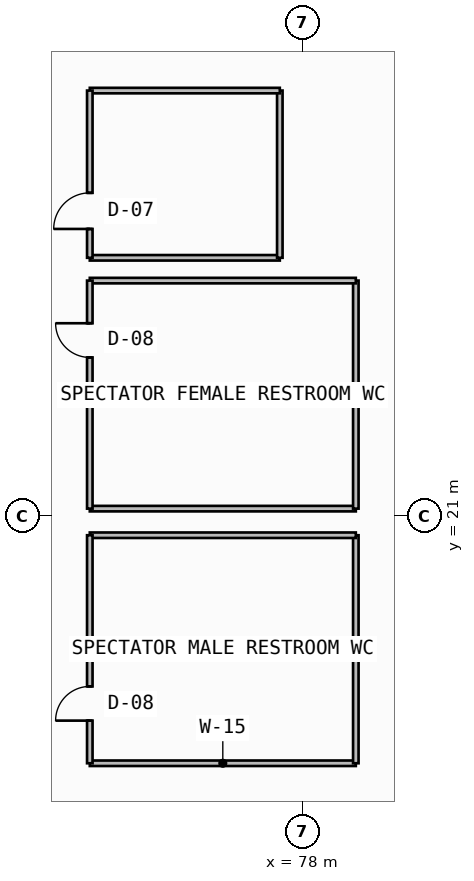
"""IFC4 building model, lengths in metres.
Left out: names, types, materials, properties, quantities, classifications, styles, units other than length and angle.
Written with IfcOpenShell. Run it as: python <this file> out.ifc"""

import sys

from ifc_helpers import new_model, si_unit, direction, frame, frame_2d, origin, place, context, subcontext, project, spatial, rectangle, extrude, element, fill, save


model = new_model("IFC4")
c1 = context("Model", 3, precision=1e-05, world=origin(), true_north=direction((0.0, 1.0)))
c2 = subcontext(c1, "Body", "Model", "MODEL_VIEW")
j1 = project(units=[si_unit("LENGTHUNIT", "METRE"), si_unit("PLANEANGLEUNIT", "RADIAN")], contexts=[c1])
p1 = place(None, origin())
s1 = spatial("IfcSite", under=j1, at=p1, CompositionType="ELEMENT")
p2 = place(p1, origin())
s2 = spatial("IfcBuilding", under=s1, at=p2, CompositionType="ELEMENT")
p3 = place(p2, frame((0.0, 0.0, 13.2)))
s3 = spatial("IfcBuildingStorey", under=s2, at=p3, CompositionType="ELEMENT", Elevation=13.2)
p4 = place(p3, frame((72.4, 14.5, 0.0), z_axis=(0.0, 0.0, 1.0), x_axis=(1.0, 0.0, 0.0)))
e1 = element("IfcWall", 1, at=p4, inside=s3, PredefinedType="PARTITIONING", context=c2, shape_type="SweptSolid", body=[
    extrude(rectangle(XDim=7.0, YDim=0.145, at=frame_2d((3.5, 0.0))), origin(), (0.0, 0.0, 1.0), 3.365),
])
p5 = place(p3, frame((79.4, 14.5, 0.0), z_axis=(0.0, 0.0, 1.0), x_axis=(0.0, 1.0, 0.0)))
e2 = element("IfcWall", 2, at=p5, inside=s3, PredefinedType="PARTITIONING", context=c2, shape_type="SweptSolid", body=[
    extrude(rectangle(XDim=6.0, YDim=0.145, at=frame_2d((3.0, 0.0))), origin(), (0.0, 0.0, 1.0), 3.165),
])
p6 = place(p3, frame((79.4, 20.5, 0.0), z_axis=(0.0, 0.0, 1.0), x_axis=(-1.0, 0.0, 0.0)))
e3 = element("IfcWall", 3, at=p6, inside=s3, PredefinedType="PARTITIONING", context=c2, shape_type="SweptSolid", body=[
    extrude(rectangle(XDim=7.0, YDim=0.145, at=frame_2d((3.5, 0.0))), origin(), (0.0, 0.0, 1.0), 3.165),
])
p7 = place(p3, frame((72.4, 20.5, 0.0), z_axis=(0.0, 0.0, 1.0), x_axis=(0.0, -1.0, 0.0)))
e4 = element("IfcWall", 4, at=p7, inside=s3, PredefinedType="PARTITIONING", context=c2, shape_type="SweptSolid", body=[
    extrude(rectangle(XDim=6.0, YDim=0.145, at=frame_2d((3.0, 0.0))), origin(), (0.0, 0.0, 1.0), 3.165),
])
p8 = place(p7, frame((3.978, 0.0, 0.0)))
e5 = element("IfcOpeningElement", 5, at=p8, cuts=e4, PredefinedType="OPENING", context=c2, shape_type="SweptSolid", body=[
    extrude(rectangle(XDim=0.9, YDim=2.1, at=frame_2d((0.45, 1.05))), frame((0.0, 0.083, 0.0), z_axis=(0.0, -1.0, 0.0), x_axis=(1.0, 0.0, 0.0)), (0.0, 0.0, 1.0), 0.165),
])
p9 = place(p3, frame((72.4, 21.2, 0.0), z_axis=(0.0, 0.0, 1.0), x_axis=(1.0, 0.0, 0.0)))
e6 = element("IfcWall", 6, at=p9, inside=s3, PredefinedType="PARTITIONING", context=c2, shape_type="SweptSolid", body=[
    extrude(rectangle(XDim=7.0, YDim=0.145, at=frame_2d((3.5, 0.0))), origin(), (0.0, 0.0, 1.0), 3.88),
])
p10 = place(p3, frame((79.4, 21.2, 0.0), z_axis=(0.0, 0.0, 1.0), x_axis=(0.0, 1.0, 0.0)))
e7 = element("IfcWall", 7, at=p10, inside=s3, PredefinedType="PARTITIONING", context=c2, shape_type="SweptSolid", body=[
    extrude(rectangle(XDim=6.0, YDim=0.145, at=frame_2d((3.0, 0.0))), origin(), (0.0, 0.0, 1.0), 3.88),
])
p11 = place(p3, frame((79.4, 27.2, 0.0), z_axis=(0.0, 0.0, 1.0), x_axis=(-1.0, 0.0, 0.0)))
e8 = element("IfcWall", 8, at=p11, inside=s3, PredefinedType="PARTITIONING", context=c2, shape_type="SweptSolid", body=[
    extrude(rectangle(XDim=7.0, YDim=0.145, at=frame_2d((3.5, 0.0))), origin(), (0.0, 0.0, 1.0), 3.88),
])
p12 = place(p3, frame((72.4, 27.2, 0.0), z_axis=(0.0, 0.0, 1.0), x_axis=(0.0, -1.0, 0.0)))
e9 = element("IfcWall", 9, at=p12, inside=s3, PredefinedType="PARTITIONING", context=c2, shape_type="SweptSolid", body=[
    extrude(rectangle(XDim=6.0, YDim=0.145, at=frame_2d((3.0, 0.0))), origin(), (0.0, 0.0, 1.0), 3.88),
])
p13 = place(p12, frame((1.122, 0.0, 0.0)))
e10 = element("IfcOpeningElement", 10, at=p13, cuts=e9, PredefinedType="OPENING", context=c2, shape_type="SweptSolid", body=[
    extrude(rectangle(XDim=0.9, YDim=2.1, at=frame_2d((0.45, 1.05))), frame((0.0, 0.083, 0.0), z_axis=(0.0, -1.0, 0.0), x_axis=(1.0, 0.0, 0.0)), (0.0, 0.0, 1.0), 0.165),
])
p14 = place(p3, frame((72.4, 27.8, 0.0), z_axis=(0.0, 0.0, 1.0), x_axis=(1.0, 0.0, 0.0)))
e11 = element("IfcWall", 11, at=p14, inside=s3, PredefinedType="PARTITIONING", context=c2, shape_type="SweptSolid", body=[
    extrude(rectangle(XDim=5.0, YDim=0.145, at=frame_2d((2.5, 0.0))), origin(), (0.0, 0.0, 1.0), 3.88),
])
p15 = place(p3, frame((77.4, 27.8, 0.0), z_axis=(0.0, 0.0, 1.0), x_axis=(0.0, 1.0, 0.0)))
e12 = element("IfcWall", 12, at=p15, inside=s3, PredefinedType="PARTITIONING", context=c2, shape_type="SweptSolid", body=[
    extrude(rectangle(XDim=4.4, YDim=0.145, at=frame_2d((2.2, 0.0))), origin(), (0.0, 0.0, 1.0), 3.88),
])
p16 = place(p3, frame((77.4, 32.2, 0.0), z_axis=(0.0, 0.0, 1.0), x_axis=(-1.0, 0.0, 0.0)))
e13 = element("IfcWall", 13, at=p16, inside=s3, PredefinedType="PARTITIONING", context=c2, shape_type="SweptSolid", body=[
    extrude(rectangle(XDim=5.0, YDim=0.145, at=frame_2d((2.5, 0.0))), origin(), (0.0, 0.0, 1.0), 3.88),
])
p17 = place(p3, frame((72.4, 32.2, 0.0), z_axis=(0.0, 0.0, 1.0), x_axis=(0.0, -1.0, 0.0)))
e14 = element("IfcWall", 14, at=p17, inside=s3, PredefinedType="PARTITIONING", context=c2, shape_type="SweptSolid", body=[
    extrude(rectangle(XDim=4.4, YDim=0.145, at=frame_2d((2.2, 0.0))), origin(), (0.0, 0.0, 1.0), 3.88),
])
p18 = place(p17, frame((2.691, 0.0, 0.0)))
e15 = element("IfcOpeningElement", 15, at=p18, cuts=e14, PredefinedType="OPENING", context=c2, shape_type="SweptSolid", body=[
    extrude(rectangle(XDim=0.95, YDim=2.15, at=frame_2d((0.475, 1.075))), frame((0.0, 0.083, 0.0), z_axis=(0.0, -1.0, 0.0), x_axis=(1.0, 0.0, 0.0)), (0.0, 0.0, 1.0), 0.165),
])
p19 = place(p8, frame((0.9, 0.0, 0.0), z_axis=(0.0, 0.0, 1.0), x_axis=(-1.0, 0.0, 0.0)))
e16 = element("IfcDoor", 16, at=p19, inside=s3, OperationType="SINGLE_SWING_LEFT", PredefinedType="DOOR", context=c2, shape_type="SweptSolid", body=[
    extrude(rectangle(XDim=0.9, YDim=2.1, at=frame_2d((0.45, 1.05))), frame((0.0, 0.025, 0.0), z_axis=(0.0, -1.0, 0.0), x_axis=(1.0, 0.0, 0.0)), (0.0, 0.0, 1.0), 0.05),
])
fill(e5, e16)
p20 = place(p13, frame((0.9, 0.0, 0.0), z_axis=(0.0, 0.0, 1.0), x_axis=(-1.0, 0.0, 0.0)))
e17 = element("IfcDoor", 17, at=p20, inside=s3, OperationType="SINGLE_SWING_RIGHT", PredefinedType="DOOR", context=c2, shape_type="SweptSolid", body=[
    extrude(rectangle(XDim=0.9, YDim=2.1, at=frame_2d((0.45, 1.05))), frame((0.0, 0.025, 0.0), z_axis=(0.0, -1.0, 0.0), x_axis=(1.0, 0.0, 0.0)), (0.0, 0.0, 1.0), 0.05),
])
fill(e10, e17)
p21 = place(p18, frame((0.95, 0.0, 0.0), z_axis=(0.0, 0.0, 1.0), x_axis=(-1.0, 0.0, 0.0)))
e18 = element("IfcDoor", 18, at=p21, inside=s3, OperationType="SINGLE_SWING_LEFT", PredefinedType="DOOR", context=c2, shape_type="SweptSolid", body=[
    extrude(rectangle(XDim=0.95, YDim=2.15, at=frame_2d((0.475, 1.075))), frame((0.0, 0.025, 0.0), z_axis=(0.0, -1.0, 0.0), x_axis=(1.0, 0.0, 0.0)), (0.0, 0.0, 1.0), 0.05),
])
fill(e15, e18)
save(model, sys.argv[1])
